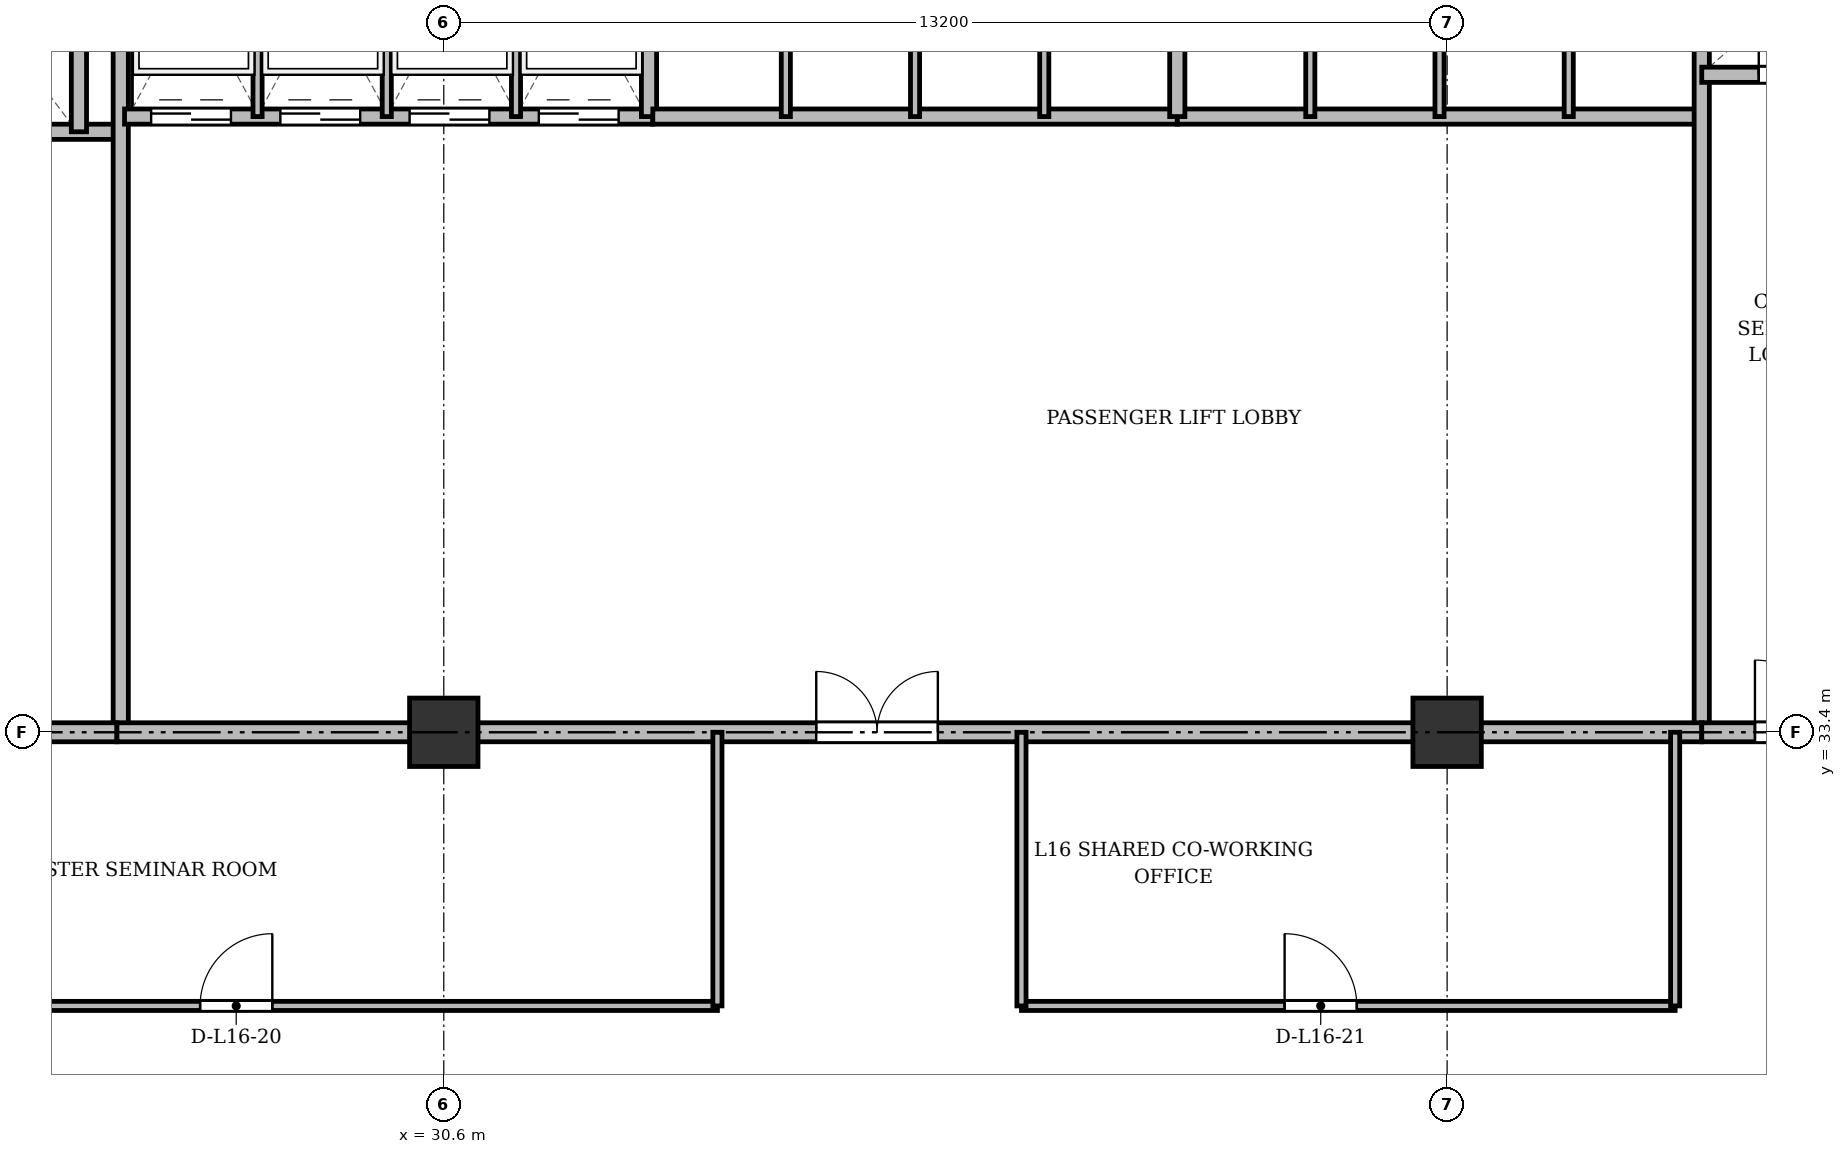
"""IFC4 building model, lengths in metres.
Left out: names, types, materials, properties, quantities, classifications, styles, units other than length and angle.
Written with IfcOpenShell. Run it as: python <this file> out.ifc"""

import sys

from ifc_helpers import new_model, si_unit, direction, frame, frame_2d, origin, origin_2d, place, context, subcontext, project, spatial, rectangle, extrude, source, transform, mapped, element, fill, save


model = new_model("IFC4")
c1 = context("Model", 3, precision=1e-05, world=origin(), true_north=direction((0.0, 1.0)))
c2 = subcontext(c1, "Body", "Model", "MODEL_VIEW")
j1 = project(units=[si_unit("LENGTHUNIT", "METRE"), si_unit("PLANEANGLEUNIT", "RADIAN")], contexts=[c1])
p1 = place(None, origin())
s1 = spatial("IfcSite", under=j1, at=p1, CompositionType="ELEMENT")
p2 = place(p1, origin())
s2 = spatial("IfcBuilding", under=s1, at=p2, CompositionType="ELEMENT")
p3 = place(p2, frame((0.0, 0.0, 63.1)))
s3 = spatial("IfcBuildingStorey", under=s2, at=p3, CompositionType="ELEMENT", Elevation=63.1)
m1 = source(origin(), c2, "Body", "SweptSolid", [
    extrude(rectangle(XDim=0.9, YDim=0.9, at=origin_2d()), origin(), (0.0, 0.0, 1.0), 3.6),
])
for number, where, z_axis, x_axis in (
    (1, (30.6, 33.4, 0.0), (0.0, 0.0, 1.0), (1.0, 0.0, 0.0)),
    (2, (43.8, 33.4, 0.0), (0.0, 0.0, 1.0), (1.0, 0.0, 0.0)),
):
    element("IfcColumn", number, at=place(p3, frame(where, z_axis=z_axis, x_axis=x_axis)), inside=s3, PredefinedType="COLUMN", context=c2, shape_type="MappedRepresentation", body=[
        mapped(m1, transform((0.0, 0.0, 0.0), x_axis=(1.0, 0.0, 0.0), y_axis=(0.0, 1.0, 0.0), z_axis=(0.0, 0.0, 1.0), scale=1.0)),
    ])
p4 = place(p3, frame((19.55, 41.3, 0.0), z_axis=(0.0, 0.0, 1.0), x_axis=(1.0, 0.0, 0.0)))
e3 = element("IfcWall", 3, at=p4, inside=s3, PredefinedType="SOLIDWALL", context=c2, shape_type="SweptSolid", body=[
    extrude(rectangle(XDim=6.75, YDim=0.2, at=frame_2d((3.375, 0.0))), origin(), (0.0, 0.0, 1.0), 3.34),
])
p5 = place(p4, frame((1.7, 0.0, 0.0)))
e4 = element("IfcOpeningElement", 4, at=p5, cuts=e3, PredefinedType="OPENING", context=c2, shape_type="SweptSolid", body=[
    extrude(rectangle(XDim=1.1, YDim=2.15, at=frame_2d((0.55, 1.075))), frame((0.0, 0.11, 0.0), z_axis=(0.0, -1.0, 0.0), x_axis=(1.0, 0.0, 0.0)), (0.0, 0.0, 1.0), 0.22),
])
p6 = place(p4, frame((4.4, 0.0, 0.0)))
e5 = element("IfcOpeningElement", 5, at=p6, cuts=e3, PredefinedType="OPENING", context=c2, shape_type="SweptSolid", body=[
    extrude(rectangle(XDim=1.1, YDim=2.15, at=frame_2d((0.55, 1.075))), frame((0.0, 0.11, 0.0), z_axis=(0.0, -1.0, 0.0), x_axis=(1.0, 0.0, 0.0)), (0.0, 0.0, 1.0), 0.22),
])
p7 = place(p3, frame((25.8, 41.3, 0.0), z_axis=(0.0, 0.0, 1.0), x_axis=(0.0, 1.0, 0.0)))
e6 = element("IfcWall", 6, at=p7, inside=s3, PredefinedType="SOLIDWALL", context=c2, shape_type="SweptSolid", body=[
    extrude(rectangle(XDim=3.4, YDim=0.2, at=frame_2d((1.7, 0.0))), origin(), (0.0, 0.0, 1.0), 3.34),
])
p8 = place(p3, frame((26.35, 33.4, 0.0), z_axis=(0.0, 0.0, 1.0), x_axis=(0.0, 1.0, 0.0)))
e7 = element("IfcWall", 7, at=p8, inside=s3, PredefinedType="SOLIDWALL", context=c2, shape_type="SweptSolid", body=[
    extrude(rectangle(XDim=11.3, YDim=0.2, at=frame_2d((5.65, 0.0))), origin(), (0.0, 0.0, 1.0), 2.69),
])
p9 = place(p3, frame((19.5, 33.4, 0.0), z_axis=(0.0, 0.0, 1.0), x_axis=(1.0, 0.0, 0.0)))
e8 = element("IfcWall", 8, at=p9, inside=s3, PredefinedType="PARTITIONING", context=c2, shape_type="SweptSolid", body=[
    extrude(rectangle(XDim=6.8, YDim=0.25, at=frame_2d((3.4, 0.0))), origin(), (0.0, 0.0, 1.0), 2.69),
])
p10 = place(p9, frame((0.75, 0.0, 0.0)))
e9 = element("IfcOpeningElement", 9, at=p10, cuts=e8, PredefinedType="OPENING", context=c2, shape_type="SweptSolid", body=[
    extrude(rectangle(XDim=1.6, YDim=2.2, at=frame_2d((0.8, 1.1))), frame((0.0, 0.135, 0.0), z_axis=(0.0, -1.0, 0.0), x_axis=(1.0, 0.0, 0.0)), (0.0, 0.0, 1.0), 0.27),
])
p11 = place(p3, frame((26.4, 41.5, 0.0), z_axis=(0.0, 0.0, 1.0), x_axis=(1.0, 0.0, 0.0)))
e10 = element("IfcWall", 10, at=p11, inside=s3, PredefinedType="SOLIDWALL", context=c2, shape_type="SweptSolid", body=[
    extrude(rectangle(XDim=6.95, YDim=0.2, at=frame_2d((3.475, 0.0))), origin(), (0.0, 0.0, 1.0), 3.34),
])
p12 = place(p11, frame((0.35, 0.0, 0.0)))
e11 = element("IfcOpeningElement", 11, at=p12, cuts=e10, PredefinedType="OPENING", context=c2, shape_type="SweptSolid", body=[
    extrude(rectangle(XDim=1.05, YDim=2.15, at=frame_2d((0.525, 1.075))), frame((0.0, 0.11, 0.0), z_axis=(0.0, -1.0, 0.0), x_axis=(1.0, 0.0, 0.0)), (0.0, 0.0, 1.0), 0.22),
])
p13 = place(p11, frame((2.05, 0.0, 0.0)))
e12 = element("IfcOpeningElement", 12, at=p13, cuts=e10, PredefinedType="OPENING", context=c2, shape_type="SweptSolid", body=[
    extrude(rectangle(XDim=1.05, YDim=2.15, at=frame_2d((0.525, 1.075))), frame((0.0, 0.11, 0.0), z_axis=(0.0, -1.0, 0.0), x_axis=(1.0, 0.0, 0.0)), (0.0, 0.0, 1.0), 0.22),
])
p14 = place(p11, frame((3.75, 0.0, 0.0)))
e13 = element("IfcOpeningElement", 13, at=p14, cuts=e10, PredefinedType="OPENING", context=c2, shape_type="SweptSolid", body=[
    extrude(rectangle(XDim=1.05, YDim=2.15, at=frame_2d((0.525, 1.075))), frame((0.0, 0.11, 0.0), z_axis=(0.0, -1.0, 0.0), x_axis=(1.0, 0.0, 0.0)), (0.0, 0.0, 1.0), 0.22),
])
p15 = place(p11, frame((5.45, 0.0, 0.0)))
e14 = element("IfcOpeningElement", 14, at=p15, cuts=e10, PredefinedType="OPENING", context=c2, shape_type="SweptSolid", body=[
    extrude(rectangle(XDim=1.05, YDim=2.15, at=frame_2d((0.525, 1.075))), frame((0.0, 0.11, 0.0), z_axis=(0.0, -1.0, 0.0), x_axis=(1.0, 0.0, 0.0)), (0.0, 0.0, 1.0), 0.22),
])
p16 = place(p3, frame((33.3, 41.5, 0.0), z_axis=(0.0, 0.0, 1.0), x_axis=(0.0, 1.0, 0.0)))
e15 = element("IfcWall", 15, at=p16, inside=s3, PredefinedType="SOLIDWALL", context=c2, shape_type="SweptSolid", body=[
    extrude(rectangle(XDim=3.2, YDim=0.2, at=frame_2d((1.6, 0.0))), origin(), (0.0, 0.0, 1.0), 3.34),
])
for number, where, z_axis, x_axis in (
    (16, (28.15, 41.5, 0.0), (0.0, 0.0, 1.0), (0.0, 1.0, 0.0)),
    (17, (29.85, 41.5, 0.0), (0.0, 0.0, 1.0), (0.0, 1.0, 0.0)),
    (18, (31.55, 41.5, 0.0), (0.0, 0.0, 1.0), (0.0, 1.0, 0.0)),
):
    element("IfcWall", number, at=place(p3, frame(where, z_axis=z_axis, x_axis=x_axis)), inside=s3, PredefinedType="PARTITIONING", context=c2, shape_type="SweptSolid", body=[
        extrude(rectangle(XDim=3.2, YDim=0.12, at=frame_2d((1.6, 0.0))), origin(), (0.0, 0.0, 1.0), 3.34),
    ])
p17 = place(p3, frame((33.35, 41.5, 0.0), z_axis=(0.0, 0.0, 1.0), x_axis=(1.0, 0.0, 0.0)))
e19 = element("IfcWall", 19, at=p17, inside=s3, PredefinedType="SOLIDWALL", context=c2, shape_type="SweptSolid", body=[
    extrude(rectangle(XDim=6.9, YDim=0.2, at=frame_2d((3.45, 0.0))), origin(), (0.0, 0.0, 1.0), 3.34),
])
for number, where, z_axis, x_axis in (
    (20, (35.1, 41.5, 0.0), (0.0, 0.0, 1.0), (0.0, 1.0, 0.0)),
    (21, (36.8, 41.5, 0.0), (0.0, 0.0, 1.0), (0.0, 1.0, 0.0)),
    (22, (38.5, 41.5, 0.0), (0.0, 0.0, 1.0), (0.0, 1.0, 0.0)),
):
    element("IfcWall", number, at=place(p3, frame(where, z_axis=z_axis, x_axis=x_axis)), inside=s3, PredefinedType="PARTITIONING", context=c2, shape_type="SweptSolid", body=[
        extrude(rectangle(XDim=3.2, YDim=0.12, at=frame_2d((1.6, 0.0))), origin(), (0.0, 0.0, 1.0), 3.34),
    ])
p18 = place(p3, frame((40.25, 41.5, 0.0), z_axis=(0.0, 0.0, 1.0), x_axis=(1.0, 0.0, 0.0)))
e23 = element("IfcWall", 23, at=p18, inside=s3, PredefinedType="SOLIDWALL", context=c2, shape_type="SweptSolid", body=[
    extrude(rectangle(XDim=6.9, YDim=0.2, at=frame_2d((3.45, 0.0))), origin(), (0.0, 0.0, 1.0), 2.752),
])
p19 = place(p3, frame((40.25, 41.5, 0.0), z_axis=(0.0, 0.0, 1.0), x_axis=(0.0, 1.0, 0.0)))
e24 = element("IfcWall", 24, at=p19, inside=s3, PredefinedType="SOLIDWALL", context=c2, shape_type="SweptSolid", body=[
    extrude(rectangle(XDim=3.2, YDim=0.2, at=frame_2d((1.6, 0.0))), origin(), (0.0, 0.0, 1.0), 3.34),
])
p20 = place(p3, frame((42.0, 41.5, 0.0), z_axis=(0.0, 0.0, 1.0), x_axis=(0.0, 1.0, 0.0)))
e25 = element("IfcWall", 25, at=p20, inside=s3, PredefinedType="PARTITIONING", context=c2, shape_type="SweptSolid", body=[
    extrude(rectangle(XDim=3.2, YDim=0.12, at=frame_2d((1.6, 0.0))), origin(), (0.0, 0.0, 1.0), 3.34),
])
p21 = place(p3, frame((43.7, 41.5, 0.0), z_axis=(0.0, 0.0, 1.0), x_axis=(0.0, 1.0, 0.0)))
e26 = element("IfcWall", 26, at=p21, inside=s3, PredefinedType="PARTITIONING", context=c2, shape_type="SweptSolid", body=[
    extrude(rectangle(XDim=3.2, YDim=0.12, at=frame_2d((1.6, 0.0))), origin(), (0.0, 0.0, 1.0), 2.752),
])
p22 = place(p3, frame((45.4, 41.5, 0.0), z_axis=(0.0, 0.0, 1.0), x_axis=(0.0, 1.0, 0.0)))
e27 = element("IfcWall", 27, at=p22, inside=s3, PredefinedType="PARTITIONING", context=c2, shape_type="SweptSolid", body=[
    extrude(rectangle(XDim=3.2, YDim=0.12, at=frame_2d((1.6, 0.0))), origin(), (0.0, 0.0, 1.0), 3.34),
])
p23 = place(p3, frame((47.15, 33.4, 0.0), z_axis=(0.0, 0.0, 1.0), x_axis=(0.0, 1.0, 0.0)))
e28 = element("IfcWall", 28, at=p23, inside=s3, PredefinedType="SOLIDWALL", context=c2, shape_type="SweptSolid", body=[
    extrude(rectangle(XDim=11.3, YDim=0.2, at=frame_2d((5.65, 0.0))), origin(), (0.0, 0.0, 1.0), 2.69),
])
p24 = place(p3, frame((26.3, 33.4, 0.0), z_axis=(0.0, 0.0, 1.0), x_axis=(1.0, 0.0, 0.0)))
e29 = element("IfcWall", 29, at=p24, inside=s3, PredefinedType="PARTITIONING", context=c2, shape_type="SweptSolid", body=[
    extrude(rectangle(XDim=20.85, YDim=0.25, at=frame_2d((10.425, 0.0))), origin(), (0.0, 0.0, 1.0), 2.69),
])
p25 = place(p24, frame((9.2, 0.0, 0.0)))
e30 = element("IfcOpeningElement", 30, at=p25, cuts=e29, PredefinedType="OPENING", context=c2, shape_type="SweptSolid", body=[
    extrude(rectangle(XDim=1.6, YDim=2.2, at=frame_2d((0.8, 1.1))), frame((0.0, 0.135, 0.0), z_axis=(0.0, -1.0, 0.0), x_axis=(1.0, 0.0, 0.0)), (0.0, 0.0, 1.0), 0.27),
])
p26 = place(p3, frame((47.15, 42.05, 0.0), z_axis=(0.0, 0.0, 1.0), x_axis=(1.0, 0.0, 0.0)))
e31 = element("IfcWall", 31, at=p26, inside=s3, PredefinedType="SOLIDWALL", context=c2, shape_type="SweptSolid", body=[
    extrude(rectangle(XDim=7.85, YDim=0.2, at=frame_2d((3.925, 0.0))), origin(), (0.0, 0.0, 1.0), 2.752),
])
p27 = place(p26, frame((0.75, 0.0, 0.0)))
e32 = element("IfcOpeningElement", 32, at=p27, cuts=e31, PredefinedType="OPENING", context=c2, shape_type="SweptSolid", body=[
    extrude(rectangle(XDim=0.9, YDim=2.1, at=frame_2d((0.45, 1.05))), frame((0.0, 0.11, 0.0), z_axis=(0.0, -1.0, 0.0), x_axis=(1.0, 0.0, 0.0)), (0.0, 0.0, 1.0), 0.22),
])
p28 = place(p26, frame((3.85, 0.0, 0.0)))
e33 = element("IfcOpeningElement", 33, at=p28, cuts=e31, PredefinedType="OPENING", context=c2, shape_type="SweptSolid", body=[
    extrude(rectangle(XDim=0.9, YDim=2.1, at=frame_2d((0.45, 1.05))), frame((0.0, 0.11, 0.0), z_axis=(0.0, -1.0, 0.0), x_axis=(1.0, 0.0, 0.0)), (0.0, 0.0, 1.0), 0.22),
])
p29 = place(p3, frame((47.15, 33.4, 0.0), z_axis=(0.0, 0.0, 1.0), x_axis=(1.0, 0.0, 0.0)))
e34 = element("IfcWall", 34, at=p29, inside=s3, PredefinedType="PARTITIONING", context=c2, shape_type="SweptSolid", body=[
    extrude(rectangle(XDim=11.15, YDim=0.25, at=frame_2d((5.575, 0.0))), origin(), (0.0, 0.0, 1.0), 2.69),
])
p30 = place(p29, frame((0.7, 0.0, 0.0)))
e35 = element("IfcOpeningElement", 35, at=p30, cuts=e34, PredefinedType="OPENING", context=c2, shape_type="SweptSolid", body=[
    extrude(rectangle(XDim=0.95, YDim=2.15, at=frame_2d((0.475, 1.075))), frame((0.0, 0.135, 0.0), z_axis=(0.0, -1.0, 0.0), x_axis=(1.0, 0.0, 0.0)), (0.0, 0.0, 1.0), 0.27),
])
p31 = place(p29, frame((6.0, 0.0, 0.0)))
e36 = element("IfcOpeningElement", 36, at=p31, cuts=e34, PredefinedType="OPENING", context=c2, shape_type="SweptSolid", body=[
    extrude(rectangle(XDim=1.2, YDim=2.15, at=frame_2d((0.6, 1.075))), frame((0.0, 0.135, 0.0), z_axis=(0.0, -1.0, 0.0), x_axis=(1.0, 0.0, 0.0)), (0.0, 0.0, 1.0), 0.27),
])
p32 = place(p3, frame((22.45, 29.8, 0.0), z_axis=(0.0, 0.0, 1.0), x_axis=(1.0, 0.0, 0.0)))
e37 = element("IfcWall", 37, at=p32, inside=s3, PredefinedType="PARTITIONING", context=c2, shape_type="SweptSolid", body=[
    extrude(rectangle(XDim=11.75, YDim=0.12, at=frame_2d((5.875, 0.0))), origin(), (0.0, 0.0, 1.0), 2.752),
])
p33 = place(p32, frame((4.944, 0.0, 0.0)))
e38 = element("IfcOpeningElement", 38, at=p33, cuts=e37, PredefinedType="OPENING", context=c2, shape_type="SweptSolid", body=[
    extrude(rectangle(XDim=0.95, YDim=2.15, at=frame_2d((0.475, 1.075))), frame((0.0, 0.07, 0.0), z_axis=(0.0, -1.0, 0.0), x_axis=(1.0, 0.0, 0.0)), (0.0, 0.0, 1.0), 0.14),
])
p34 = place(p3, frame((38.2, 29.8, 0.0), z_axis=(0.0, 0.0, 1.0), x_axis=(1.0, 0.0, 0.0)))
e39 = element("IfcWall", 39, at=p34, inside=s3, PredefinedType="PARTITIONING", context=c2, shape_type="SweptSolid", body=[
    extrude(rectangle(XDim=8.6, YDim=0.12, at=frame_2d((4.3, 0.0))), origin(), (0.0, 0.0, 1.0), 2.752),
])
p35 = place(p34, frame((3.462, 0.0, 0.0)))
e40 = element("IfcOpeningElement", 40, at=p35, cuts=e39, PredefinedType="OPENING", context=c2, shape_type="SweptSolid", body=[
    extrude(rectangle(XDim=0.95, YDim=2.15, at=frame_2d((0.475, 1.075))), frame((0.0, 0.07, 0.0), z_axis=(0.0, -1.0, 0.0), x_axis=(1.0, 0.0, 0.0)), (0.0, 0.0, 1.0), 0.14),
])
for number, where, z_axis, x_axis in (
    (41, (34.2, 29.8, 0.0), (0.0, 0.0, 1.0), (0.0, 1.0, 0.0)),
    (42, (38.2, 29.8, 0.0), (0.0, 0.0, 1.0), (0.0, 1.0, 0.0)),
    (43, (46.8, 29.8, 0.0), (0.0, 0.0, 1.0), (0.0, 1.0, 0.0)),
):
    element("IfcWall", number, at=place(p3, frame(where, z_axis=z_axis, x_axis=x_axis)), inside=s3, PredefinedType="PARTITIONING", context=c2, shape_type="SweptSolid", body=[
        extrude(rectangle(XDim=3.6, YDim=0.12, at=frame_2d((1.8, 0.0))), origin(), (0.0, 0.0, 1.0), 2.69),
    ])
m2 = source(origin(), c2, "Body", "SweptSolid", [
    extrude(rectangle(XDim=1.05, YDim=2.15, at=frame_2d((0.525, 1.075))), frame((0.0, 0.025, 0.0), z_axis=(0.0, -1.0, 0.0), x_axis=(1.0, 0.0, 0.0)), (0.0, 0.0, 1.0), 0.05),
])
p36 = place(p12, origin())
e44 = element("IfcDoor", 44, at=p36, inside=s3, OperationType="DOUBLE_DOOR_SLIDING", PredefinedType="DOOR", context=c2, shape_type="MappedRepresentation", body=[
    mapped(m2, transform((0.0, 0.0, 0.0), x_axis=(1.0, 0.0, 0.0), y_axis=(0.0, 1.0, 0.0), z_axis=(0.0, 0.0, 1.0), scale=1.0)),
])
fill(e11, e44)
p37 = place(p13, origin())
e45 = element("IfcDoor", 45, at=p37, inside=s3, OperationType="DOUBLE_DOOR_SLIDING", PredefinedType="DOOR", context=c2, shape_type="MappedRepresentation", body=[
    mapped(m2, transform((0.0, 0.0, 0.0), x_axis=(1.0, 0.0, 0.0), y_axis=(0.0, 1.0, 0.0), z_axis=(0.0, 0.0, 1.0), scale=1.0)),
])
fill(e12, e45)
p38 = place(p14, origin())
e46 = element("IfcDoor", 46, at=p38, inside=s3, OperationType="DOUBLE_DOOR_SLIDING", PredefinedType="DOOR", context=c2, shape_type="MappedRepresentation", body=[
    mapped(m2, transform((0.0, 0.0, 0.0), x_axis=(1.0, 0.0, 0.0), y_axis=(0.0, 1.0, 0.0), z_axis=(0.0, 0.0, 1.0), scale=1.0)),
])
fill(e13, e46)
p39 = place(p15, origin())
e47 = element("IfcDoor", 47, at=p39, inside=s3, OperationType="DOUBLE_DOOR_SLIDING", PredefinedType="DOOR", context=c2, shape_type="MappedRepresentation", body=[
    mapped(m2, transform((0.0, 0.0, 0.0), x_axis=(1.0, 0.0, 0.0), y_axis=(0.0, 1.0, 0.0), z_axis=(0.0, 0.0, 1.0), scale=1.0)),
])
fill(e14, e47)
m3 = source(origin(), c2, "Body", "SweptSolid", [
    extrude(rectangle(XDim=1.6, YDim=2.2, at=frame_2d((0.8, 1.1))), frame((0.0, 0.025, 0.0), z_axis=(0.0, -1.0, 0.0), x_axis=(1.0, 0.0, 0.0)), (0.0, 0.0, 1.0), 0.05),
])
p40 = place(p25, origin())
e48 = element("IfcDoor", 48, at=p40, inside=s3, OperationType="DOUBLE_DOOR_SINGLE_SWING", PredefinedType="DOOR", context=c2, shape_type="MappedRepresentation", body=[
    mapped(m3, transform((0.0, 0.0, 0.0), x_axis=(1.0, 0.0, 0.0), y_axis=(0.0, 1.0, 0.0), z_axis=(0.0, 0.0, 1.0), scale=1.0)),
])
fill(e30, e48)
m4 = source(origin(), c2, "Body", "SweptSolid", [
    extrude(rectangle(XDim=0.9, YDim=2.1, at=frame_2d((0.45, 1.05))), frame((0.0, 0.025, 0.0), z_axis=(0.0, -1.0, 0.0), x_axis=(1.0, 0.0, 0.0)), (0.0, 0.0, 1.0), 0.05),
])
p41 = place(p27, origin())
e49 = element("IfcDoor", 49, at=p41, inside=s3, OperationType="SINGLE_SWING_LEFT", PredefinedType="DOOR", context=c2, shape_type="MappedRepresentation", body=[
    mapped(m4, transform((0.0, 0.0, 0.0), x_axis=(1.0, 0.0, 0.0), y_axis=(0.0, 1.0, 0.0), z_axis=(0.0, 0.0, 1.0), scale=1.0)),
])
fill(e32, e49)
m5 = source(origin(), c2, "Body", "SweptSolid", [
    extrude(rectangle(XDim=0.95, YDim=2.15, at=frame_2d((0.475, 1.075))), frame((0.0, 0.025, 0.0), z_axis=(0.0, -1.0, 0.0), x_axis=(1.0, 0.0, 0.0)), (0.0, 0.0, 1.0), 0.05),
])
p42 = place(p30, origin())
e50 = element("IfcDoor", 50, at=p42, inside=s3, OperationType="SINGLE_SWING_LEFT", PredefinedType="DOOR", context=c2, shape_type="MappedRepresentation", body=[
    mapped(m5, transform((0.0, 0.0, 0.0), x_axis=(1.0, 0.0, 0.0), y_axis=(0.0, 1.0, 0.0), z_axis=(0.0, 0.0, 1.0), scale=1.0)),
])
fill(e35, e50)
p43 = place(p33, origin())
e51 = element("IfcDoor", 51, at=p43, inside=s3, OperationType="SINGLE_SWING_RIGHT", PredefinedType="DOOR", context=c2, shape_type="MappedRepresentation", body=[
    mapped(m5, transform((0.0, 0.0, 0.0), x_axis=(1.0, 0.0, 0.0), y_axis=(0.0, 1.0, 0.0), z_axis=(0.0, 0.0, 1.0), scale=1.0)),
])
fill(e38, e51)
p44 = place(p35, origin())
e52 = element("IfcDoor", 52, at=p44, inside=s3, OperationType="SINGLE_SWING_LEFT", PredefinedType="DOOR", context=c2, shape_type="MappedRepresentation", body=[
    mapped(m5, transform((0.0, 0.0, 0.0), x_axis=(1.0, 0.0, 0.0), y_axis=(0.0, 1.0, 0.0), z_axis=(0.0, 0.0, 1.0), scale=1.0)),
])
fill(e40, e52)
save(model, sys.argv[1])
